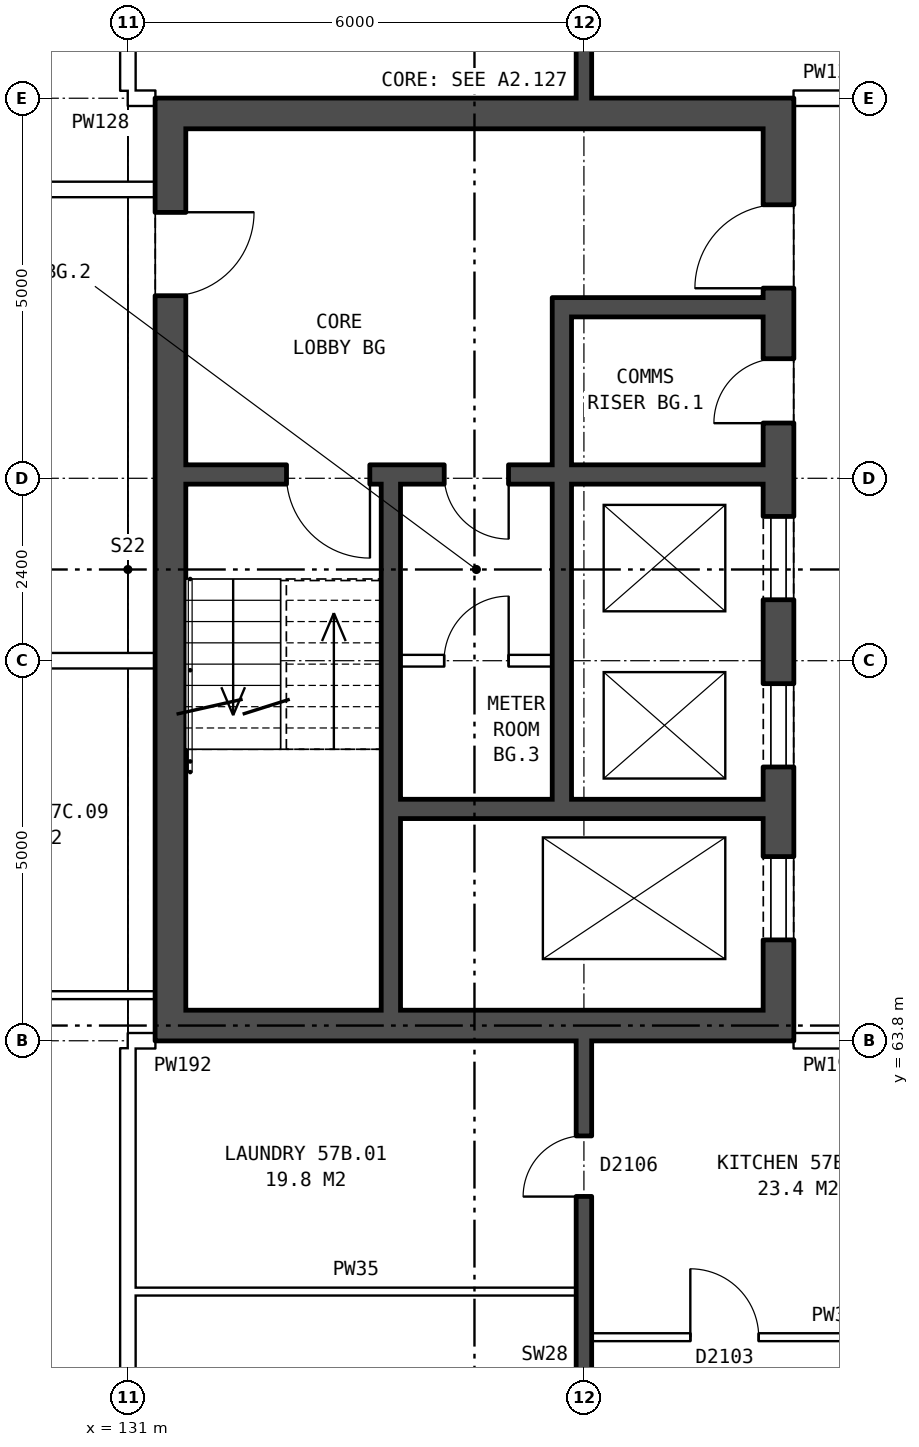
"""IFC4 building model, lengths in metres.
Left out: names, types, materials, properties, quantities, classifications, styles, units other than length and angle.
Written with IfcOpenShell. Run it as: python <this file> out.ifc"""

import sys

from ifc_helpers import new_model, si_unit, direction, frame, frame_2d, origin, place, context, subcontext, project, spatial, rectangle, extrude, element, fill, save


model = new_model("IFC4")
c1 = context("Model", 3, precision=1e-05, world=origin(), true_north=direction((0.0, 1.0)))
c2 = subcontext(c1, "Body", "Model", "MODEL_VIEW")
j1 = project(units=[si_unit("LENGTHUNIT", "METRE"), si_unit("PLANEANGLEUNIT", "RADIAN")], contexts=[c1])
p1 = place(None, origin())
s1 = spatial("IfcSite", under=j1, at=p1, CompositionType="ELEMENT")
p2 = place(p1, origin())
s2 = spatial("IfcBuilding", under=s1, at=p2, CompositionType="ELEMENT")
p3 = place(p2, frame((0.0, 0.0, 202.8)))
s3 = spatial("IfcBuildingStorey", under=s2, at=p3, CompositionType="ELEMENT", Elevation=202.8)
p4 = place(p3, frame((139.56, 63.8, 0.0), z_axis=(0.0, 0.0, 1.0), x_axis=(0.0, 1.0, 0.0)))
e1 = element("IfcWall", 1, at=p4, inside=s3, PredefinedType="SHEAR", context=c2, shape_type="SweptSolid", body=[
    extrude(rectangle(XDim=12.4, YDim=0.4, at=frame_2d((6.2, 0.0))), origin(), (0.0, 0.0, 1.0), 2.85),
])
p5 = place(p4, frame((1.325, 0.0, 0.0)))
e2 = element("IfcOpeningElement", 2, at=p5, cuts=e1, PredefinedType="OPENING", context=c2, shape_type="SweptSolid", body=[
    extrude(rectangle(XDim=1.1, YDim=2.1, at=frame_2d((0.55, 1.05))), frame((0.0, 0.21, 0.0), z_axis=(0.0, -1.0, 0.0), x_axis=(1.0, 0.0, 0.0)), (0.0, 0.0, 1.0), 0.42),
])
p6 = place(p4, frame((3.6, 0.0, 0.0)))
e3 = element("IfcOpeningElement", 3, at=p6, cuts=e1, PredefinedType="OPENING", context=c2, shape_type="SweptSolid", body=[
    extrude(rectangle(XDim=1.1, YDim=2.1, at=frame_2d((0.55, 1.05))), frame((0.0, 0.21, 0.0), z_axis=(0.0, -1.0, 0.0), x_axis=(1.0, 0.0, 0.0)), (0.0, 0.0, 1.0), 0.42),
])
p7 = place(p4, frame((5.8, 0.0, 0.0)))
e4 = element("IfcOpeningElement", 4, at=p7, cuts=e1, PredefinedType="OPENING", context=c2, shape_type="SweptSolid", body=[
    extrude(rectangle(XDim=1.1, YDim=2.1, at=frame_2d((0.55, 1.05))), frame((0.0, 0.21, 0.0), z_axis=(0.0, -1.0, 0.0), x_axis=(1.0, 0.0, 0.0)), (0.0, 0.0, 1.0), 0.42),
])
p8 = place(p4, frame((9.9, 0.0, 0.0)))
e5 = element("IfcOpeningElement", 5, at=p8, cuts=e1, PredefinedType="OPENING", context=c2, shape_type="SweptSolid", body=[
    extrude(rectangle(XDim=1.1, YDim=2.1, at=frame_2d((0.55, 1.05))), frame((0.0, 0.21, 0.0), z_axis=(0.0, -1.0, 0.0), x_axis=(1.0, 0.0, 0.0)), (0.0, 0.0, 1.0), 0.42),
])
p9 = place(p4, frame((8.125, 0.0, 0.0)))
e6 = element("IfcOpeningElement", 6, at=p9, cuts=e1, PredefinedType="OPENING", context=c2, shape_type="SweptSolid", body=[
    extrude(rectangle(XDim=0.85, YDim=2.1, at=frame_2d((0.425, 1.05))), frame((0.0, 0.21, 0.0), z_axis=(0.0, -1.0, 0.0), x_axis=(1.0, 0.0, 0.0)), (0.0, 0.0, 1.0), 0.42),
])
p10 = place(p3, frame((131.56, 63.8, 0.0), z_axis=(0.0, 0.0, 1.0), x_axis=(0.0, 1.0, 0.0)))
e7 = element("IfcWall", 7, at=p10, inside=s3, PredefinedType="SHEAR", context=c2, shape_type="SweptSolid", body=[
    extrude(rectangle(XDim=12.4, YDim=0.4, at=frame_2d((6.2, 0.0))), origin(), (0.0, 0.0, 1.0), 2.85),
])
p11 = place(p10, frame((9.8, 0.0, 0.0)))
e8 = element("IfcOpeningElement", 8, at=p11, cuts=e7, PredefinedType="OPENING", context=c2, shape_type="SweptSolid", body=[
    extrude(rectangle(XDim=1.1, YDim=2.1, at=frame_2d((0.55, 1.05))), frame((0.0, 0.21, 0.0), z_axis=(0.0, -1.0, 0.0), x_axis=(1.0, 0.0, 0.0)), (0.0, 0.0, 1.0), 0.42),
])
for number, where, z_axis, x_axis in (
    (9, (139.36, 64.0, 0.0), (0.0, 0.0, 1.0), (-1.0, 0.0, 0.0)),
    (10, (139.36, 76.0, 0.0), (0.0, 0.0, 1.0), (-1.0, 0.0, 0.0)),
):
    element("IfcWall", number, at=place(p3, frame(where, z_axis=z_axis, x_axis=x_axis)), inside=s3, PredefinedType="SHEAR", context=c2, shape_type="SweptSolid", body=[
        extrude(rectangle(XDim=7.6, YDim=0.4, at=frame_2d((3.8, 0.0))), origin(), (0.0, 0.0, 1.0), 2.85),
    ])
p12 = place(p3, frame((139.36, 66.85, 0.0), z_axis=(0.0, 0.0, 1.0), x_axis=(-1.0, 0.0, 0.0)))
e11 = element("IfcWall", 11, at=p12, inside=s3, PredefinedType="SHEAR", context=c2, shape_type="SweptSolid", body=[
    extrude(rectangle(XDim=4.775, YDim=0.25, at=frame_2d((2.388, 0.0))), origin(), (0.0, 0.0, 1.0), 2.85),
])
p13 = place(p3, frame((136.585, 68.8, 0.0), z_axis=(0.0, 0.0, 1.0), x_axis=(-1.0, 0.0, 0.0)))
e12 = element("IfcWall", 12, at=p13, inside=s3, PredefinedType="PARTITIONING", context=c2, shape_type="SweptSolid", body=[
    extrude(rectangle(XDim=2.0, YDim=0.15, at=frame_2d((1.0, 0.0))), origin(), (0.0, 0.0, 1.0), 2.85),
])
p14 = place(p13, frame((0.575, 0.0, 0.0)))
e13 = element("IfcOpeningElement", 13, at=p14, cuts=e12, PredefinedType="OPENING", context=c2, shape_type="SweptSolid", body=[
    extrude(rectangle(XDim=0.85, YDim=2.1, at=frame_2d((0.425, 1.05))), frame((0.0, 0.085, 0.0), z_axis=(0.0, -1.0, 0.0), x_axis=(1.0, 0.0, 0.0)), (0.0, 0.0, 1.0), 0.17),
])
p15 = place(p3, frame((139.36, 71.25, 0.0), z_axis=(0.0, 0.0, 1.0), x_axis=(-1.0, 0.0, 0.0)))
e14 = element("IfcWall", 14, at=p15, inside=s3, PredefinedType="SHEAR", context=c2, shape_type="SweptSolid", body=[
    extrude(rectangle(XDim=7.6, YDim=0.25, at=frame_2d((3.8, 0.0))), origin(), (0.0, 0.0, 1.0), 2.85),
])
p16 = place(p15, frame((5.175, 0.0, 0.0)))
e15 = element("IfcOpeningElement", 15, at=p16, cuts=e14, PredefinedType="OPENING", context=c2, shape_type="SweptSolid", body=[
    extrude(rectangle(XDim=1.1, YDim=2.1, at=frame_2d((0.55, 1.05))), frame((0.0, 0.135, 0.0), z_axis=(0.0, -1.0, 0.0), x_axis=(1.0, 0.0, 0.0)), (0.0, 0.0, 1.0), 0.27),
])
p17 = place(p15, frame((3.35, 0.0, 0.0)))
e16 = element("IfcOpeningElement", 16, at=p17, cuts=e14, PredefinedType="OPENING", context=c2, shape_type="SweptSolid", body=[
    extrude(rectangle(XDim=0.85, YDim=2.1, at=frame_2d((0.425, 1.05))), frame((0.0, 0.135, 0.0), z_axis=(0.0, -1.0, 0.0), x_axis=(1.0, 0.0, 0.0)), (0.0, 0.0, 1.0), 0.27),
])
p18 = place(p3, frame((139.36, 73.45, 0.0), z_axis=(0.0, 0.0, 1.0), x_axis=(-1.0, 0.0, 0.0)))
e17 = element("IfcWall", 17, at=p18, inside=s3, PredefinedType="SHEAR", context=c2, shape_type="SweptSolid", body=[
    extrude(rectangle(XDim=2.525, YDim=0.25, at=frame_2d((1.263, 0.0))), origin(), (0.0, 0.0, 1.0), 2.85),
])
p19 = place(p3, frame((136.71, 66.975, 0.0), z_axis=(0.0, 0.0, 1.0), x_axis=(0.0, 1.0, 0.0)))
e18 = element("IfcWall", 18, at=p19, inside=s3, PredefinedType="SHEAR", context=c2, shape_type="SweptSolid", body=[
    extrude(rectangle(XDim=4.15, YDim=0.25, at=frame_2d((2.075, 0.0))), origin(), (0.0, 0.0, 1.0), 2.85),
])
p20 = place(p3, frame((136.71, 71.375, 0.0), z_axis=(0.0, 0.0, 1.0), x_axis=(0.0, 1.0, 0.0)))
e19 = element("IfcWall", 19, at=p20, inside=s3, PredefinedType="SHEAR", context=c2, shape_type="SweptSolid", body=[
    extrude(rectangle(XDim=2.2, YDim=0.25, at=frame_2d((1.1, 0.0))), origin(), (0.0, 0.0, 1.0), 2.85),
])
p21 = place(p3, frame((134.46, 64.2, 0.0), z_axis=(0.0, 0.0, 1.0), x_axis=(0.0, 1.0, 0.0)))
e20 = element("IfcWall", 20, at=p21, inside=s3, PredefinedType="SHEAR", context=c2, shape_type="SweptSolid", body=[
    extrude(rectangle(XDim=6.925, YDim=0.25, at=frame_2d((3.462, 0.0))), origin(), (0.0, 0.0, 1.0), 2.85),
])
p22 = place(p3, frame((137.1, 59.9, 0.0), z_axis=(0.0, 0.0, 1.0), x_axis=(1.0, 0.0, 0.0)))
e21 = element("IfcWall", 21, at=p22, inside=s3, PredefinedType="PARTITIONING", context=c2, shape_type="SweptSolid", body=[
    extrude(rectangle(XDim=5.8, YDim=0.1, at=frame_2d((2.9, 0.0))), origin(), (0.0, 0.0, 1.0), 2.85),
])
p23 = place(p22, frame((1.3, 0.0, 0.0)))
e22 = element("IfcOpeningElement", 22, at=p23, cuts=e21, PredefinedType="OPENING", context=c2, shape_type="SweptSolid", body=[
    extrude(rectangle(XDim=0.9, YDim=2.1, at=frame_2d((0.45, 1.05))), frame((0.0, 0.06, 0.0), z_axis=(0.0, -1.0, 0.0), x_axis=(1.0, 0.0, 0.0)), (0.0, 0.0, 1.0), 0.12),
])
p24 = place(p22, frame((4.2, 0.0, 0.0)))
e23 = element("IfcOpeningElement", 23, at=p24, cuts=e21, PredefinedType="OPENING", context=c2, shape_type="SweptSolid", body=[
    extrude(rectangle(XDim=0.9, YDim=2.1, at=frame_2d((0.45, 1.05))), frame((0.0, 0.06, 0.0), z_axis=(0.0, -1.0, 0.0), x_axis=(1.0, 0.0, 0.0)), (0.0, 0.0, 1.0), 0.12),
])
p25 = place(p3, frame((131.1, 60.5, 0.0), z_axis=(0.0, 0.0, 1.0), x_axis=(1.0, 0.0, 0.0)))
e24 = element("IfcWall", 24, at=p25, inside=s3, PredefinedType="PARTITIONING", context=c2, shape_type="SweptSolid", body=[
    extrude(rectangle(XDim=5.8, YDim=0.1, at=frame_2d((2.9, 0.0))), origin(), (0.0, 0.0, 1.0), 2.85),
])
p26 = place(p3, frame((131.0, 63.8, 0.0), z_axis=(0.0, 0.0, 1.0), x_axis=(1.0, 0.0, 0.0)))
e25 = element("IfcWall", 25, at=p26, inside=s3, PredefinedType="PARTITIONING", context=c2, shape_type="SweptSolid", body=[
    extrude(rectangle(XDim=0.36, YDim=0.2, at=frame_2d((0.18, 0.0))), origin(), (0.0, 0.0, 1.0), 2.85),
])
p27 = place(p3, frame((139.76, 63.8, 0.0), z_axis=(0.0, 0.0, 1.0), x_axis=(1.0, 0.0, 0.0)))
e26 = element("IfcWall", 26, at=p27, inside=s3, PredefinedType="PARTITIONING", context=c2, shape_type="SweptSolid", body=[
    extrude(rectangle(XDim=3.0, YDim=0.2, at=frame_2d((1.5, 0.0))), origin(), (0.0, 0.0, 1.0), 2.85),
])
p28 = place(p27, frame((1.0, 0.0, 0.0)))
e27 = element("IfcOpeningElement", 27, at=p28, cuts=e26, PredefinedType="OPENING", context=c2, shape_type="SweptSolid", body=[
    extrude(rectangle(XDim=1.0, YDim=2.1, at=frame_2d((0.5, 1.05))), frame((0.0, 0.11, 0.0), z_axis=(0.0, -1.0, 0.0), x_axis=(1.0, 0.0, 0.0)), (0.0, 0.0, 1.0), 0.22),
])
p29 = place(p3, frame((127.912, 64.4, 0.0), z_axis=(0.0, 0.0, 1.0), x_axis=(1.0, 0.0, 0.0)))
e28 = element("IfcWall", 28, at=p29, inside=s3, PredefinedType="PARTITIONING", context=c2, shape_type="SweptSolid", body=[
    extrude(rectangle(XDim=3.448, YDim=0.1, at=frame_2d((1.724, 0.0))), origin(), (0.0, 0.0, 1.0), 2.85),
])
p30 = place(p3, frame((75.64, 68.8, 0.0), z_axis=(0.0, 0.0, 1.0), x_axis=(1.0, 0.0, 0.0)))
e29 = element("IfcWall", 29, at=p30, inside=s3, PredefinedType="PARTITIONING", context=c2, shape_type="SweptSolid", body=[
    extrude(rectangle(XDim=55.72, YDim=0.2, at=frame_2d((27.86, 0.0))), origin(), (0.0, 0.0, 1.0), 2.85),
])
p31 = place(p30, frame((5.191, 0.0, 0.0)))
e30 = element("IfcOpeningElement", 30, at=p31, cuts=e29, PredefinedType="OPENING", context=c2, shape_type="SweptSolid", body=[
    extrude(rectangle(XDim=1.0, YDim=2.1, at=frame_2d((0.5, 1.05))), frame((0.0, 0.11, 0.0), z_axis=(0.0, -1.0, 0.0), x_axis=(1.0, 0.0, 0.0)), (0.0, 0.0, 1.0), 0.22),
])
p32 = place(p30, frame((12.241, 0.0, 0.0)))
e31 = element("IfcOpeningElement", 31, at=p32, cuts=e29, PredefinedType="OPENING", context=c2, shape_type="SweptSolid", body=[
    extrude(rectangle(XDim=1.0, YDim=2.1, at=frame_2d((0.5, 1.05))), frame((0.0, 0.11, 0.0), z_axis=(0.0, -1.0, 0.0), x_axis=(1.0, 0.0, 0.0)), (0.0, 0.0, 1.0), 0.22),
])
p33 = place(p30, frame((22.553, 0.0, 0.0)))
e32 = element("IfcOpeningElement", 32, at=p33, cuts=e29, PredefinedType="OPENING", context=c2, shape_type="SweptSolid", body=[
    extrude(rectangle(XDim=1.0, YDim=2.1, at=frame_2d((0.5, 1.05))), frame((0.0, 0.11, 0.0), z_axis=(0.0, -1.0, 0.0), x_axis=(1.0, 0.0, 0.0)), (0.0, 0.0, 1.0), 0.22),
])
p34 = place(p30, frame((32.866, 0.0, 0.0)))
e33 = element("IfcOpeningElement", 33, at=p34, cuts=e29, PredefinedType="OPENING", context=c2, shape_type="SweptSolid", body=[
    extrude(rectangle(XDim=1.0, YDim=2.1, at=frame_2d((0.5, 1.05))), frame((0.0, 0.11, 0.0), z_axis=(0.0, -1.0, 0.0), x_axis=(1.0, 0.0, 0.0)), (0.0, 0.0, 1.0), 0.22),
])
p35 = place(p30, frame((36.303, 0.0, 0.0)))
e34 = element("IfcOpeningElement", 34, at=p35, cuts=e29, PredefinedType="OPENING", context=c2, shape_type="SweptSolid", body=[
    extrude(rectangle(XDim=1.0, YDim=2.1, at=frame_2d((0.5, 1.05))), frame((0.0, 0.11, 0.0), z_axis=(0.0, -1.0, 0.0), x_axis=(1.0, 0.0, 0.0)), (0.0, 0.0, 1.0), 0.22),
])
p36 = place(p30, frame((43.178, 0.0, 0.0)))
e35 = element("IfcOpeningElement", 35, at=p36, cuts=e29, PredefinedType="OPENING", context=c2, shape_type="SweptSolid", body=[
    extrude(rectangle(XDim=1.0, YDim=2.1, at=frame_2d((0.5, 1.05))), frame((0.0, 0.11, 0.0), z_axis=(0.0, -1.0, 0.0), x_axis=(1.0, 0.0, 0.0)), (0.0, 0.0, 1.0), 0.22),
])
p37 = place(p30, frame((50.053, 0.0, 0.0)))
e36 = element("IfcOpeningElement", 36, at=p37, cuts=e29, PredefinedType="OPENING", context=c2, shape_type="SweptSolid", body=[
    extrude(rectangle(XDim=1.0, YDim=2.1, at=frame_2d((0.5, 1.05))), frame((0.0, 0.11, 0.0), z_axis=(0.0, -1.0, 0.0), x_axis=(1.0, 0.0, 0.0)), (0.0, 0.0, 1.0), 0.22),
])
p38 = place(p3, frame((124.475, 75.0, 0.0), z_axis=(0.0, 0.0, 1.0), x_axis=(1.0, 0.0, 0.0)))
e37 = element("IfcWall", 37, at=p38, inside=s3, PredefinedType="PARTITIONING", context=c2, shape_type="SweptSolid", body=[
    extrude(rectangle(XDim=6.885, YDim=0.2, at=frame_2d((3.442, 0.0))), origin(), (0.0, 0.0, 1.0), 2.85),
])
p39 = place(p38, frame((2.992, 0.0, 0.0)))
e38 = element("IfcOpeningElement", 38, at=p39, cuts=e37, PredefinedType="OPENING", context=c2, shape_type="SweptSolid", body=[
    extrude(rectangle(XDim=0.9, YDim=2.1, at=frame_2d((0.45, 1.05))), frame((0.0, 0.11, 0.0), z_axis=(0.0, -1.0, 0.0), x_axis=(1.0, 0.0, 0.0)), (0.0, 0.0, 1.0), 0.22),
])
p40 = place(p3, frame((131.0, 76.2, 0.0), z_axis=(0.0, 0.0, 1.0), x_axis=(1.0, 0.0, 0.0)))
e39 = element("IfcWall", 39, at=p40, inside=s3, PredefinedType="PARTITIONING", context=c2, shape_type="SweptSolid", body=[
    extrude(rectangle(XDim=0.36, YDim=0.2, at=frame_2d((0.18, 0.0))), origin(), (0.0, 0.0, 1.0), 2.85),
])
p41 = place(p3, frame((139.76, 76.2, 0.0), z_axis=(0.0, 0.0, 1.0), x_axis=(1.0, 0.0, 0.0)))
e40 = element("IfcWall", 40, at=p41, inside=s3, PredefinedType="PARTITIONING", context=c2, shape_type="SweptSolid", body=[
    extrude(rectangle(XDim=3.0, YDim=0.2, at=frame_2d((1.5, 0.0))), origin(), (0.0, 0.0, 1.0), 2.85),
])
p42 = place(p41, frame((1.0, 0.0, 0.0)))
e41 = element("IfcOpeningElement", 41, at=p42, cuts=e40, PredefinedType="OPENING", context=c2, shape_type="SweptSolid", body=[
    extrude(rectangle(XDim=1.0, YDim=2.1, at=frame_2d((0.5, 1.05))), frame((0.0, 0.11, 0.0), z_axis=(0.0, -1.0, 0.0), x_axis=(1.0, 0.0, 0.0)), (0.0, 0.0, 1.0), 0.22),
])
for number, where, z_axis, x_axis in (
    (42, (131.0, 54.36, 0.0), (0.0, 0.0, 1.0), (0.0, 1.0, 0.0)),
    (43, (131.0, 76.3, 0.0), (0.0, 0.0, 1.0), (0.0, 1.0, 0.0)),
):
    element("IfcWall", number, at=place(p3, frame(where, z_axis=z_axis, x_axis=x_axis)), inside=s3, PredefinedType="PARTITIONING", context=c2, shape_type="SweptSolid", body=[
        extrude(rectangle(XDim=9.34, YDim=0.2, at=frame_2d((4.67, 0.0))), origin(), (0.0, 0.0, 1.0), 2.85),
    ])
p43 = place(p3, frame((137.0, 54.36, 0.0), z_axis=(0.0, 0.0, 1.0), x_axis=(0.0, 1.0, 0.0)))
e44 = element("IfcWall", 44, at=p43, inside=s3, PredefinedType="SOLIDWALL", context=c2, shape_type="SweptSolid", body=[
    extrude(rectangle(XDim=9.44, YDim=0.2, at=frame_2d((4.72, 0.0))), origin(), (0.0, 0.0, 1.0), 2.85),
])
p44 = place(p43, frame((2.32, 0.0, 0.0)))
e45 = element("IfcOpeningElement", 45, at=p44, cuts=e44, PredefinedType="OPENING", context=c2, shape_type="SweptSolid", body=[
    extrude(rectangle(XDim=0.9, YDim=2.1, at=frame_2d((0.45, 1.05))), frame((0.0, 0.11, 0.0), z_axis=(0.0, -1.0, 0.0), x_axis=(1.0, 0.0, 0.0)), (0.0, 0.0, 1.0), 0.22),
])
p45 = place(p43, frame((7.39, 0.0, 0.0)))
e46 = element("IfcOpeningElement", 46, at=p45, cuts=e44, PredefinedType="OPENING", context=c2, shape_type="SweptSolid", body=[
    extrude(rectangle(XDim=0.8, YDim=2.1, at=frame_2d((0.4, 1.05))), frame((0.0, 0.11, 0.0), z_axis=(0.0, -1.0, 0.0), x_axis=(1.0, 0.0, 0.0)), (0.0, 0.0, 1.0), 0.22),
])
p46 = place(p3, frame((137.0, 76.2, 0.0), z_axis=(0.0, 0.0, 1.0), x_axis=(0.0, 1.0, 0.0)))
e47 = element("IfcWall", 47, at=p46, inside=s3, PredefinedType="SOLIDWALL", context=c2, shape_type="SweptSolid", body=[
    extrude(rectangle(XDim=9.44, YDim=0.2, at=frame_2d((4.72, 0.0))), origin(), (0.0, 0.0, 1.0), 2.85),
])
p47 = place(p46, frame((6.07, 0.0, 0.0)))
e48 = element("IfcOpeningElement", 48, at=p47, cuts=e47, PredefinedType="OPENING", context=c2, shape_type="SweptSolid", body=[
    extrude(rectangle(XDim=0.9, YDim=2.1, at=frame_2d((0.45, 1.05))), frame((0.0, 0.11, 0.0), z_axis=(0.0, -1.0, 0.0), x_axis=(1.0, 0.0, 0.0)), (0.0, 0.0, 1.0), 0.22),
])
p48 = place(p46, frame((1.25, 0.0, 0.0)))
e49 = element("IfcOpeningElement", 49, at=p48, cuts=e47, PredefinedType="OPENING", context=c2, shape_type="SweptSolid", body=[
    extrude(rectangle(XDim=0.8, YDim=2.1, at=frame_2d((0.4, 1.05))), frame((0.0, 0.11, 0.0), z_axis=(0.0, -1.0, 0.0), x_axis=(1.0, 0.0, 0.0)), (0.0, 0.0, 1.0), 0.22),
])
p49 = place(p5, origin())
e50 = element("IfcDoor", 50, at=p49, inside=s3, OperationType="DOUBLE_DOOR_SLIDING", PredefinedType="DOOR", context=c2, shape_type="SweptSolid", body=[
    extrude(rectangle(XDim=1.1, YDim=2.1, at=frame_2d((0.55, 1.05))), frame((0.0, 0.185, 0.0), z_axis=(0.0, -1.0, 0.0), x_axis=(1.0, 0.0, 0.0)), (0.0, 0.0, 1.0), 0.05),
])
fill(e2, e50)
p50 = place(p6, origin())
e51 = element("IfcDoor", 51, at=p50, inside=s3, OperationType="DOUBLE_DOOR_SLIDING", PredefinedType="DOOR", context=c2, shape_type="SweptSolid", body=[
    extrude(rectangle(XDim=1.1, YDim=2.1, at=frame_2d((0.55, 1.05))), frame((0.0, 0.185, 0.0), z_axis=(0.0, -1.0, 0.0), x_axis=(1.0, 0.0, 0.0)), (0.0, 0.0, 1.0), 0.05),
])
fill(e3, e51)
p51 = place(p7, origin())
e52 = element("IfcDoor", 52, at=p51, inside=s3, OperationType="DOUBLE_DOOR_SLIDING", PredefinedType="DOOR", context=c2, shape_type="SweptSolid", body=[
    extrude(rectangle(XDim=1.1, YDim=2.1, at=frame_2d((0.55, 1.05))), frame((0.0, 0.185, 0.0), z_axis=(0.0, -1.0, 0.0), x_axis=(1.0, 0.0, 0.0)), (0.0, 0.0, 1.0), 0.05),
])
fill(e4, e52)
p52 = place(p8, origin())
e53 = element("IfcDoor", 53, at=p52, inside=s3, OperationType="SINGLE_SWING_LEFT", PredefinedType="DOOR", context=c2, shape_type="SweptSolid", body=[
    extrude(rectangle(XDim=1.1, YDim=2.1, at=frame_2d((0.55, 1.05))), frame((0.0, 0.185, 0.0), z_axis=(0.0, -1.0, 0.0), x_axis=(1.0, 0.0, 0.0)), (0.0, 0.0, 1.0), 0.05),
])
fill(e5, e53)
p53 = place(p16, origin())
e54 = element("IfcDoor", 54, at=p53, inside=s3, OperationType="SINGLE_SWING_LEFT", PredefinedType="DOOR", context=c2, shape_type="SweptSolid", body=[
    extrude(rectangle(XDim=1.1, YDim=2.1, at=frame_2d((0.55, 1.05))), frame((0.0, 0.025, 0.0), z_axis=(0.0, -1.0, 0.0), x_axis=(1.0, 0.0, 0.0)), (0.0, 0.0, 1.0), 0.05),
])
fill(e15, e54)
p54 = place(p9, origin())
e55 = element("IfcDoor", 55, at=p54, inside=s3, OperationType="SINGLE_SWING_LEFT", PredefinedType="DOOR", context=c2, shape_type="SweptSolid", body=[
    extrude(rectangle(XDim=0.85, YDim=2.1, at=frame_2d((0.425, 1.05))), frame((0.0, 0.185, 0.0), z_axis=(0.0, -1.0, 0.0), x_axis=(1.0, 0.0, 0.0)), (0.0, 0.0, 1.0), 0.05),
])
fill(e6, e55)
p55 = place(p17, origin())
e56 = element("IfcDoor", 56, at=p55, inside=s3, OperationType="SINGLE_SWING_LEFT", PredefinedType="DOOR", context=c2, shape_type="SweptSolid", body=[
    extrude(rectangle(XDim=0.85, YDim=2.1, at=frame_2d((0.425, 1.05))), frame((0.0, 0.025, 0.0), z_axis=(0.0, -1.0, 0.0), x_axis=(1.0, 0.0, 0.0)), (0.0, 0.0, 1.0), 0.05),
])
fill(e16, e56)
p56 = place(p14, frame((0.85, 0.0, 0.0), z_axis=(0.0, 0.0, 1.0), x_axis=(-1.0, 0.0, 0.0)))
e57 = element("IfcDoor", 57, at=p56, inside=s3, OperationType="SINGLE_SWING_RIGHT", PredefinedType="DOOR", context=c2, shape_type="SweptSolid", body=[
    extrude(rectangle(XDim=0.85, YDim=2.1, at=frame_2d((0.425, 1.05))), frame((0.0, 0.025, 0.0), z_axis=(0.0, -1.0, 0.0), x_axis=(1.0, 0.0, 0.0)), (0.0, 0.0, 1.0), 0.05),
])
fill(e13, e57)
p57 = place(p11, frame((1.1, 0.0, 0.0), z_axis=(0.0, 0.0, 1.0), x_axis=(-1.0, 0.0, 0.0)))
e58 = element("IfcDoor", 58, at=p57, inside=s3, OperationType="SINGLE_SWING_LEFT", PredefinedType="DOOR", context=c2, shape_type="SweptSolid", body=[
    extrude(rectangle(XDim=1.1, YDim=2.1, at=frame_2d((0.55, 1.05))), frame((0.0, 0.185, 0.0), z_axis=(0.0, -1.0, 0.0), x_axis=(1.0, 0.0, 0.0)), (0.0, 0.0, 1.0), 0.05),
])
fill(e8, e58)
p58 = place(p23, origin())
e59 = element("IfcDoor", 59, at=p58, inside=s3, OperationType="SINGLE_SWING_LEFT", PredefinedType="DOOR", context=c2, shape_type="SweptSolid", body=[
    extrude(rectangle(XDim=0.9, YDim=2.1, at=frame_2d((0.45, 1.05))), frame((0.0, 0.025, 0.0), z_axis=(0.0, -1.0, 0.0), x_axis=(1.0, 0.0, 0.0)), (0.0, 0.0, 1.0), 0.05),
])
fill(e22, e59)
p59 = place(p45, origin())
e60 = element("IfcDoor", 60, at=p59, inside=s3, OperationType="SINGLE_SWING_LEFT", PredefinedType="DOOR", context=c2, shape_type="SweptSolid", body=[
    extrude(rectangle(XDim=0.8, YDim=2.1, at=frame_2d((0.4, 1.05))), frame((0.0, 0.025, 0.0), z_axis=(0.0, -1.0, 0.0), x_axis=(1.0, 0.0, 0.0)), (0.0, 0.0, 1.0), 0.05),
])
fill(e46, e60)
save(model, sys.argv[1])
